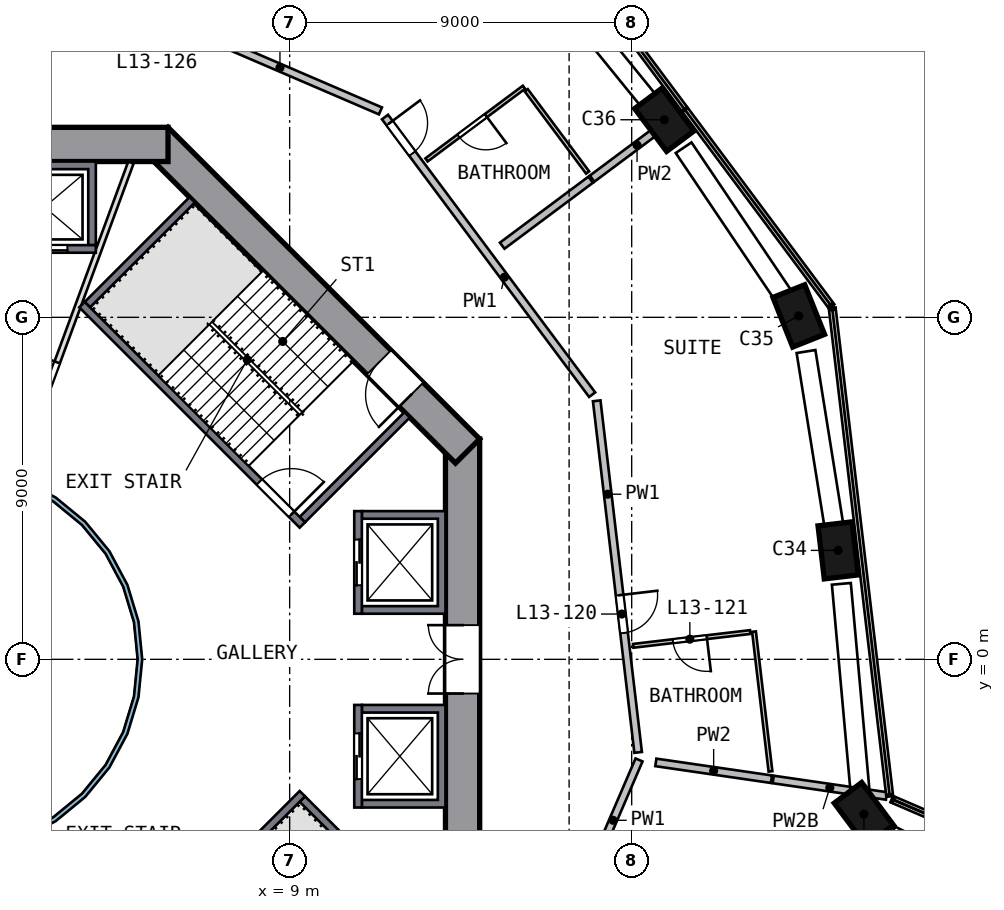
"""IFC4 building model, lengths in metres.
Left out: names, types, materials, properties, quantities, classifications, styles, units other than length and angle.
Written with IfcOpenShell. Run it as: python <this file> out.ifc"""

import sys

from ifc_helpers import new_model, si_unit, direction, frame, frame_2d, origin, origin_2d, place, context, subcontext, project, spatial, polyline, rectangle, outline, extrude, element, fill, save


model = new_model("IFC4")
c1 = context("Model", 3, precision=1e-05, world=origin(), true_north=direction((0.0, 1.0)))
c2 = subcontext(c1, "Body", "Model", "MODEL_VIEW")
j1 = project(units=[si_unit("LENGTHUNIT", "METRE"), si_unit("PLANEANGLEUNIT", "RADIAN")], contexts=[c1])
p1 = place(None, origin())
s1 = spatial("IfcSite", under=j1, at=p1, CompositionType="ELEMENT")
p2 = place(p1, origin())
s2 = spatial("IfcBuilding", under=s1, at=p2, CompositionType="ELEMENT")
p3 = place(p2, frame((0.0, 0.0, 60.0)))
s3 = spatial("IfcBuildingStorey", under=s2, at=p3, CompositionType="ELEMENT", Elevation=60.0)
p4 = place(p3, frame((24.093, -4.183, 0.0), z_axis=(0.014797173, 0.089479375, 0.99587875), x_axis=(0.59972786, -0.797738666, 0.062765553)))
e1 = element("IfcColumn", 1, at=p4, inside=s3, PredefinedType="COLUMN", context=c2, shape_type="SweptSolid", body=[
    extrude(rectangle(XDim=1.4, YDim=0.9, at=origin_2d()), origin(), (0.0, 0.0, 1.0), 4.207),
])
p5 = place(p3, frame((23.446, 2.763, 0.0), z_axis=(-0.010970439, 0.0868348, 0.99616232), x_axis=(-0.116510829, 0.989325596, -0.087521946)))
e2 = element("IfcColumn", 2, at=p5, inside=s3, PredefinedType="COLUMN", context=c2, shape_type="SweptSolid", body=[
    extrude(rectangle(XDim=1.4, YDim=0.9, at=origin_2d()), origin(), (0.0, 0.0, 1.0), 4.206),
])
p6 = place(p3, frame((22.437, 8.938, 0.0), z_axis=(-0.033833866, 0.082930694, 0.995980808), x_axis=(0.368430604, -0.925330874, 0.089563737)))
e3 = element("IfcColumn", 3, at=p6, inside=s3, PredefinedType="COLUMN", context=c2, shape_type="SweptSolid", body=[
    extrude(rectangle(XDim=1.4, YDim=0.9, at=origin_2d()), origin(), (0.0, 0.0, 1.0), 4.207),
])
p7 = place(p3, frame((18.924, 14.115, 0.0), z_axis=(-0.052936472, 0.069769341, 0.996157602), x_axis=(-0.595400375, 0.798641913, -0.087575616)))
e4 = element("IfcColumn", 4, at=p7, inside=s3, PredefinedType="COLUMN", context=c2, shape_type="SweptSolid", body=[
    extrude(rectangle(XDim=1.4, YDim=0.9, at=origin_2d()), origin(), (0.0, 0.0, 1.0), 4.206),
])
p8 = place(p3, frame((13.55, -5.799, 0.0), z_axis=(0.0, 0.0, 1.0), x_axis=(0.0, 1.0, 0.0)))
e5 = element("IfcWall", 5, at=p8, inside=s3, PredefinedType="SHEAR", context=c2, shape_type="SweptSolid", body=[
    extrude(rectangle(XDim=11.598, YDim=0.9, at=frame_2d((5.799, 0.0))), origin(), (0.0, 0.0, 1.0), 4.5),
])
p9 = place(p8, frame((4.899, 0.0, 0.0)))
e6 = element("IfcOpeningElement", 6, at=p9, cuts=e5, PredefinedType="OPENING", context=c2, shape_type="SweptSolid", body=[
    extrude(rectangle(XDim=1.8, YDim=2.1, at=frame_2d((0.9, 1.05))), frame((0.0, 0.46, 0.0), z_axis=(0.0, -1.0, 0.0), x_axis=(1.0, 0.0, 0.0)), (0.0, 0.0, 1.0), 0.92),
])
p10 = place(p3, frame((13.682, 5.481, 0.0), z_axis=(0.0, 0.0, 1.0), x_axis=(-0.707106781, 0.707106781, 0.0)))
e7 = element("IfcWall", 7, at=p10, inside=s3, PredefinedType="SHEAR", context=c2, shape_type="SweptSolid", body=[
    extrude(rectangle(XDim=11.598, YDim=0.9, at=frame_2d((5.799, 0.0))), origin(), (0.0, 0.0, 1.0), 4.5),
])
p11 = place(p10, frame((2.099, 0.0, 0.0)))
e8 = element("IfcOpeningElement", 8, at=p11, cuts=e7, PredefinedType="OPENING", context=c2, shape_type="SweptSolid", body=[
    extrude(rectangle(XDim=1.2, YDim=2.1, at=frame_2d((0.6, 1.05))), frame((0.0, 0.46, 0.0), z_axis=(0.0, -1.0, 0.0), x_axis=(1.0, 0.0, 0.0)), (0.0, 0.0, 1.0), 0.92),
])
p12 = place(p3, frame((5.799, 13.55, 0.0), z_axis=(0.0, 0.0, 1.0), x_axis=(-1.0, 0.0, 0.0)))
e9 = element("IfcWall", 9, at=p12, inside=s3, PredefinedType="SHEAR", context=c2, shape_type="SweptSolid", body=[
    extrude(rectangle(XDim=11.598, YDim=0.9, at=frame_2d((5.799, 0.0))), origin(), (0.0, 0.0, 1.0), 4.5),
])
p13 = place(p12, frame((4.899, 0.0, 0.0)))
e10 = element("IfcOpeningElement", 10, at=p13, cuts=e9, PredefinedType="OPENING", context=c2, shape_type="SweptSolid", body=[
    extrude(rectangle(XDim=1.8, YDim=2.1, at=frame_2d((0.9, 1.05))), frame((0.0, 0.46, 0.0), z_axis=(0.0, -1.0, 0.0), x_axis=(1.0, 0.0, 0.0)), (0.0, 0.0, 1.0), 0.92),
])
p14 = place(p3, origin())
e11 = element("IfcWall", 11, at=p14, inside=s3, PredefinedType="SOLIDWALL", context=c2, shape_type="SweptSolid", body=[
    extrude(outline(polyline([(13.1, -3.9), (10.9, -3.9), (10.9, -3.7), (12.9, -3.7), (12.9, -1.4), (10.9, -1.4), (10.9, -1.2), (13.1, -1.2), (13.1, -3.9)])), origin(), (0.0, 0.0, 1.0), 4.19),
])
p15 = place(p3, frame((10.8, -1.2, 0.0), z_axis=(0.0, 0.0, 1.0), x_axis=(0.0, -1.0, 0.0)))
e12 = element("IfcWall", 12, at=p15, inside=s3, PredefinedType="SOLIDWALL", context=c2, shape_type="SweptSolid", body=[
    extrude(rectangle(XDim=2.7, YDim=0.2, at=frame_2d((1.35, 0.0))), origin(), (0.0, 0.0, 1.0), 4.19),
])
p16 = place(p15, frame((0.75, 0.0, 0.0)))
e13 = element("IfcOpeningElement", 13, at=p16, cuts=e12, PredefinedType="OPENING", context=c2, shape_type="SweptSolid", body=[
    extrude(rectangle(XDim=1.2, YDim=2.1, at=frame_2d((0.6, 1.05))), frame((0.0, 0.11, 0.0), z_axis=(0.0, -1.0, 0.0), x_axis=(1.0, 0.0, 0.0)), (0.0, 0.0, 1.0), 0.22),
])
p17 = place(p3, origin())
e14 = element("IfcWall", 14, at=p17, inside=s3, PredefinedType="SOLIDWALL", context=c2, shape_type="SweptSolid", body=[
    extrude(outline(polyline([(13.1, 3.9), (13.1, 1.2), (10.9, 1.2), (10.9, 1.4), (12.9, 1.4), (12.9, 3.7), (10.9, 3.7), (10.9, 3.9), (13.1, 3.9)])), origin(), (0.0, 0.0, 1.0), 4.19),
])
p18 = place(p3, frame((10.8, 1.2, 0.0), z_axis=(0.0, 0.0, 1.0), x_axis=(0.0, 1.0, 0.0)))
e15 = element("IfcWall", 15, at=p18, inside=s3, PredefinedType="SOLIDWALL", context=c2, shape_type="SweptSolid", body=[
    extrude(rectangle(XDim=2.7, YDim=0.2, at=frame_2d((1.35, 0.0))), origin(), (0.0, 0.0, 1.0), 4.19),
])
p19 = place(p18, frame((0.75, 0.0, 0.0)))
e16 = element("IfcOpeningElement", 16, at=p19, cuts=e15, PredefinedType="OPENING", context=c2, shape_type="SweptSolid", body=[
    extrude(rectangle(XDim=1.2, YDim=2.1, at=frame_2d((0.6, 1.05))), frame((0.0, 0.11, 0.0), z_axis=(0.0, -1.0, 0.0), x_axis=(1.0, 0.0, 0.0)), (0.0, 0.0, 1.0), 0.22),
])
p20 = place(p3, origin())
e17 = element("IfcWall", 17, at=p20, inside=s3, PredefinedType="SOLIDWALL", context=c2, shape_type="SweptSolid", body=[
    extrude(outline(polyline([(3.9, 13.1), (3.9, 10.9), (3.7, 10.9), (3.7, 12.9), (1.4, 12.9), (1.4, 10.9), (1.2, 10.9), (1.2, 13.1), (3.9, 13.1)])), origin(), (0.0, 0.0, 1.0), 4.19),
])
p21 = place(p3, frame((1.2, 10.8, 0.0), z_axis=(0.0, 0.0, 1.0), x_axis=(1.0, 0.0, 0.0)))
e18 = element("IfcWall", 18, at=p21, inside=s3, PredefinedType="SOLIDWALL", context=c2, shape_type="SweptSolid", body=[
    extrude(rectangle(XDim=2.7, YDim=0.2, at=frame_2d((1.35, 0.0))), origin(), (0.0, 0.0, 1.0), 4.19),
])
p22 = place(p21, frame((0.75, 0.0, 0.0)))
e19 = element("IfcOpeningElement", 19, at=p22, cuts=e18, PredefinedType="OPENING", context=c2, shape_type="SweptSolid", body=[
    extrude(rectangle(XDim=1.2, YDim=2.1, at=frame_2d((0.6, 1.05))), frame((0.0, 0.11, 0.0), z_axis=(0.0, -1.0, 0.0), x_axis=(1.0, 0.0, 0.0)), (0.0, 0.0, 1.0), 0.22),
])
p23 = place(p3, frame((3.535, 9.334, 0.0), z_axis=(0.0, 0.0, 1.0), x_axis=(0.707106781, -0.707106781, 0.0)))
e20 = element("IfcWall", 20, at=p23, inside=s3, PredefinedType="SOLIDWALL", context=c2, shape_type="SweptSolid", body=[
    extrude(rectangle(XDim=8.2, YDim=0.2, at=frame_2d((4.1, 0.0))), origin(), (0.0, 0.0, 1.0), 4.19),
])
p24 = place(p23, frame((6.6, 0.0, 0.0)))
e21 = element("IfcOpeningElement", 21, at=p24, cuts=e20, PredefinedType="OPENING", context=c2, shape_type="SweptSolid", body=[
    extrude(rectangle(XDim=1.2, YDim=2.1, at=frame_2d((0.6, 1.05))), frame((0.0, 0.11, 0.0), z_axis=(0.0, -1.0, 0.0), x_axis=(1.0, 0.0, 0.0)), (0.0, 0.0, 1.0), 0.22),
])
for number, where, z_axis, x_axis in (
    (22, (9.334, 3.677, 0.0), (0.0, 0.0, 1.0), (0.707, 0.707, 0.0)),
    (23, (3.677, 9.334, 0.0), (0.0, 0.0, 1.0), (0.707, 0.707, 0.0)),
):
    element("IfcWall", number, at=place(p3, frame(where, z_axis=z_axis, x_axis=x_axis)), inside=s3, PredefinedType="SOLIDWALL", context=c2, shape_type="SweptSolid", body=[
        extrude(rectangle(XDim=3.9, YDim=0.2, at=frame_2d((1.95, 0.0))), origin(), (0.0, 0.0, 1.0), 4.19),
    ])
p25 = place(p3, frame((9.334, -3.535, 0.0), z_axis=(0.0, 0.0, 1.0), x_axis=(-0.707106781, -0.707106781, 0.0)))
e24 = element("IfcWall", 24, at=p25, inside=s3, PredefinedType="SOLIDWALL", context=c2, shape_type="SweptSolid", body=[
    extrude(rectangle(XDim=8.2, YDim=0.2, at=frame_2d((4.1, 0.0))), origin(), (0.0, 0.0, 1.0), 4.19),
])
p26 = place(p25, frame((6.6, 0.0, 0.0)))
e25 = element("IfcOpeningElement", 25, at=p26, cuts=e24, PredefinedType="OPENING", context=c2, shape_type="SweptSolid", body=[
    extrude(rectangle(XDim=1.2, YDim=2.1, at=frame_2d((0.6, 1.05))), frame((0.0, 0.11, 0.0), z_axis=(0.0, -1.0, 0.0), x_axis=(1.0, 0.0, 0.0)), (0.0, 0.0, 1.0), 0.22),
])
p27 = place(p3, frame((9.334, -3.677, 0.0), z_axis=(0.0, 0.0, 1.0), x_axis=(0.707106781, -0.707106781, 0.0)))
e26 = element("IfcWall", 26, at=p27, inside=s3, PredefinedType="SOLIDWALL", context=c2, shape_type="SweptSolid", body=[
    extrude(rectangle(XDim=3.9, YDim=0.2, at=frame_2d((1.95, 0.0))), origin(), (0.0, 0.0, 1.0), 4.19),
])
p28 = place(p3, frame((1.776, 4.813, 0.0), z_axis=(0.0, 0.0, 1.0), x_axis=(0.346112737, 0.93819293, 0.0)))
e27 = element("IfcWall", 27, at=p28, inside=s3, PredefinedType="PARTITIONING", context=c2, shape_type="SweptSolid", body=[
    extrude(rectangle(XDim=8.803, YDim=0.15, at=frame_2d((4.402, 0.0))), origin(), (0.0, 0.0, 1.0), 4.19),
])
p29 = place(p28, frame((1.4, 0.0, 0.0)))
e28 = element("IfcOpeningElement", 28, at=p29, cuts=e27, PredefinedType="OPENING", context=c2, shape_type="SweptSolid", body=[
    extrude(rectangle(XDim=1.8, YDim=2.1, at=frame_2d((0.9, 1.05))), frame((0.0, 0.085, 0.0), z_axis=(0.0, -1.0, 0.0), x_axis=(1.0, 0.0, 0.0)), (0.0, 0.0, 1.0), 0.17),
])
p30 = place(p3, origin())
e29 = element("IfcWall", 29, at=p30, inside=s3, PredefinedType="SOLIDWALL", context=c2, shape_type="SweptSolid", body=[
    extrude(outline(polyline([(5.021, -0.999), (4.73, -1.959), (4.257, -2.844), (3.62, -3.62), (2.844, -4.257), (1.959, -4.73), (0.999, -5.021), (0.0, -5.12), (-0.999, -5.021), (-1.959, -4.73), (-2.844, -4.257), (-3.62, -3.62), (-4.257, -2.844), (-4.73, -1.959), (-5.021, -0.999), (-5.12, 0.0), (-5.021, 0.999), (-4.73, 1.959), (-4.257, 2.844), (-3.62, 3.62), (-2.844, 4.257), (-1.959, 4.73), (-0.999, 5.021), (0.0, 5.12), (0.999, 5.021), (1.959, 4.73), (2.844, 4.257), (3.62, 3.62), (4.257, 2.844), (4.73, 1.959), (5.021, 0.999), (5.12, 0.0), (5.021, -0.999)]), holes=[polyline([(4.904, 0.976), (4.619, 1.913), (4.157, 2.778), (3.535, 3.535), (2.778, 4.157), (1.913, 4.619), (0.976, 4.904), (0.0, 5.0), (-0.976, 4.904), (-1.913, 4.619), (-2.778, 4.157), (-3.535, 3.535), (-4.157, 2.778), (-4.619, 1.913), (-4.904, 0.976), (-5.0, 0.0), (-4.904, -0.976), (-4.619, -1.913), (-4.157, -2.778), (-3.535, -3.535), (-2.778, -4.157), (-1.913, -4.619), (-0.976, -4.904), (0.0, -5.0), (0.976, -4.904), (1.913, -4.619), (2.778, -4.157), (3.535, -3.535), (4.157, -2.778), (4.619, -1.913), (4.904, -0.976), (5.0, 0.0), (4.904, 0.976)])]), origin(), (0.0, 0.0, 1.0), 4.19),
])
p31 = place(p3, frame((2.648, 18.193, 0.0), z_axis=(0.0, 0.0, 1.0), x_axis=(0.918582764, -0.395228675, 0.0)))
e30 = element("IfcWall", 30, at=p31, inside=s3, PredefinedType="SOLIDWALL", context=c2, shape_type="SweptSolid", body=[
    extrude(rectangle(XDim=9.516, YDim=0.2, at=frame_2d((4.758, 0.0))), origin(), (0.0, 0.0, 1.0), 4.19),
])
p32 = place(p31, frame((2.658, 0.0, 0.0)))
e31 = element("IfcOpeningElement", 31, at=p32, cuts=e30, PredefinedType="OPENING", context=c2, shape_type="SweptSolid", body=[
    extrude(rectangle(XDim=0.9, YDim=2.1, at=frame_2d((0.45, 1.05))), frame((0.0, 0.11, 0.0), z_axis=(0.0, -1.0, 0.0), x_axis=(1.0, 0.0, 0.0)), (0.0, 0.0, 1.0), 0.22),
])
p33 = place(p31, frame((0.3, 0.0, 0.0)))
e32 = element("IfcOpeningElement", 32, at=p33, cuts=e30, PredefinedType="OPENING", context=c2, shape_type="SweptSolid", body=[
    extrude(rectangle(XDim=0.9, YDim=2.1, at=frame_2d((0.45, 1.05))), frame((0.0, 0.11, 0.0), z_axis=(0.0, -1.0, 0.0), x_axis=(1.0, 0.0, 0.0)), (0.0, 0.0, 1.0), 0.22),
])
p34 = place(p3, frame((11.51, 14.271, 0.0), z_axis=(0.0, 0.0, 1.0), x_axis=(0.597893887, -0.801575262, 0.0)))
e33 = element("IfcWall", 33, at=p34, inside=s3, PredefinedType="SOLIDWALL", context=c2, shape_type="SweptSolid", body=[
    extrude(rectangle(XDim=9.116, YDim=0.2, at=frame_2d((4.558, 0.0))), origin(), (0.0, 0.0, 1.0), 4.19),
])
p35 = place(p34, frame((0.2, 0.0, 0.0)))
e34 = element("IfcOpeningElement", 34, at=p35, cuts=e33, PredefinedType="OPENING", context=c2, shape_type="SweptSolid", body=[
    extrude(rectangle(XDim=1.0, YDim=2.1, at=frame_2d((0.5, 1.05))), frame((0.0, 0.11, 0.0), z_axis=(0.0, -1.0, 0.0), x_axis=(1.0, 0.0, 0.0)), (0.0, 0.0, 1.0), 0.22),
])
p36 = place(p3, frame((16.826, -5.824, 0.0), z_axis=(0.0, 0.0, 1.0), x_axis=(0.39522258, 0.918585386, 0.0)))
e35 = element("IfcWall", 35, at=p36, inside=s3, PredefinedType="SOLIDWALL", context=c2, shape_type="SweptSolid", body=[
    extrude(rectangle(XDim=3.458, YDim=0.2, at=frame_2d((1.729, 0.0))), origin(), (0.0, 0.0, 1.0), 4.19),
])
p37 = place(p3, frame((17.08, 6.803, 0.0), z_axis=(0.0, 0.0, 1.0), x_axis=(0.117013065, -0.993130375, 0.0)))
e36 = element("IfcWall", 36, at=p37, inside=s3, PredefinedType="SOLIDWALL", context=c2, shape_type="SweptSolid", body=[
    extrude(rectangle(XDim=9.316, YDim=0.2, at=frame_2d((4.658, 0.0))), origin(), (0.0, 0.0, 1.0), 4.19),
])
p38 = place(p37, frame((5.15, 0.0, 0.0)))
e37 = element("IfcOpeningElement", 37, at=p38, cuts=e36, PredefinedType="OPENING", context=c2, shape_type="SweptSolid", body=[
    extrude(rectangle(XDim=1.0, YDim=2.1, at=frame_2d((0.5, 1.05))), frame((0.0, 0.11, 0.0), z_axis=(0.0, -1.0, 0.0), x_axis=(1.0, 0.0, 0.0)), (0.0, 0.0, 1.0), 0.22),
])
p39 = place(p3, frame((14.593, 10.885, 0.0), z_axis=(0.0, 0.0, 1.0), x_axis=(0.801560567, 0.597913587, 0.0)))
e38 = element("IfcWall", 38, at=p39, inside=s3, PredefinedType="SOLIDWALL", context=c2, shape_type="SweptSolid", body=[
    extrude(rectangle(XDim=2.905, YDim=0.2, at=frame_2d((1.452, 0.0))), origin(), (0.0, 0.0, 1.0), 4.19),
])
p40 = place(p3, frame((16.958, 12.649, 0.0), z_axis=(0.0, 0.0, 1.0), x_axis=(0.801545514, 0.597933767, 0.0)))
e39 = element("IfcWall", 39, at=p40, inside=s3, PredefinedType="SOLIDWALL", context=c2, shape_type="SweptSolid", body=[
    extrude(rectangle(XDim=2.952, YDim=0.2, at=frame_2d((1.476, 0.0))), origin(), (0.0, 0.0, 1.0), 4.19),
])
p41 = place(p3, frame((18.636, -2.712, 0.0), z_axis=(0.0, 0.0, 1.0), x_axis=(0.989572863, -0.144033152, 0.0)))
e40 = element("IfcWall", 40, at=p41, inside=s3, PredefinedType="SOLIDWALL", context=c2, shape_type="SweptSolid", body=[
    extrude(rectangle(XDim=3.075, YDim=0.2, at=frame_2d((1.537, 0.0))), origin(), (0.0, 0.0, 1.0), 4.19),
])
p42 = place(p3, frame((21.724, -3.161, 0.0), z_axis=(0.0, 0.0, 1.0), x_axis=(0.989568164, -0.144065429, 0.0)))
e41 = element("IfcWall", 41, at=p42, inside=s3, PredefinedType="SOLIDWALL", context=c2, shape_type="SweptSolid", body=[
    extrude(rectangle(XDim=3.011, YDim=0.2, at=frame_2d((1.506, 0.0))), origin(), (0.0, 0.0, 1.0), 3.69),
])
p43 = place(p3, frame((15.166, 15.055, 0.0), z_axis=(0.0, 0.0, 1.0), x_axis=(-0.801553723, -0.597922761, 0.0)))
e42 = element("IfcWall", 42, at=p43, inside=s3, PredefinedType="PARTITIONING", context=c2, shape_type="SweptSolid", body=[
    extrude(rectangle(XDim=3.2, YDim=0.1, at=frame_2d((1.6, 0.0))), origin(), (0.0, 0.0, 1.0), 4.19),
])
p44 = place(p43, frame((1.25, 0.0, 0.0)))
e43 = element("IfcOpeningElement", 43, at=p44, cuts=e42, PredefinedType="OPENING", context=c2, shape_type="SweptSolid", body=[
    extrude(rectangle(XDim=0.9, YDim=2.1, at=frame_2d((0.45, 1.05))), frame((0.0, 0.06, 0.0), z_axis=(0.0, -1.0, 0.0), x_axis=(1.0, 0.0, 0.0)), (0.0, 0.0, 1.0), 0.12),
])
p45 = place(p3, frame((15.226, 14.975, 0.0), z_axis=(0.0, 0.0, 1.0), x_axis=(0.597914488, -0.801559895, 0.0)))
e44 = element("IfcWall", 44, at=p45, inside=s3, PredefinedType="PARTITIONING", context=c2, shape_type="SweptSolid", body=[
    extrude(rectangle(XDim=2.7, YDim=0.1, at=frame_2d((1.35, 0.0))), origin(), (0.0, 0.0, 1.0), 4.19),
])
p46 = place(p3, frame((21.119, 0.718, 0.0), z_axis=(0.0, 0.0, 1.0), x_axis=(-0.993128007, -0.117033166, 0.0)))
e45 = element("IfcWall", 45, at=p46, inside=s3, PredefinedType="PARTITIONING", context=c2, shape_type="SweptSolid", body=[
    extrude(rectangle(XDim=3.1, YDim=0.1, at=frame_2d((1.55, 0.0))), origin(), (0.0, 0.0, 1.0), 4.19),
])
p47 = place(p46, frame((1.15, 0.0, 0.0)))
e46 = element("IfcOpeningElement", 46, at=p47, cuts=e45, PredefinedType="OPENING", context=c2, shape_type="SweptSolid", body=[
    extrude(rectangle(XDim=0.9, YDim=2.1, at=frame_2d((0.45, 1.05))), frame((0.0, 0.06, 0.0), z_axis=(0.0, -1.0, 0.0), x_axis=(1.0, 0.0, 0.0)), (0.0, 0.0, 1.0), 0.12),
])
p48 = place(p3, frame((21.219, 0.729, 0.0), z_axis=(0.0, 0.0, 1.0), x_axis=(0.116998046, -0.993132145, 0.0)))
e47 = element("IfcWall", 47, at=p48, inside=s3, PredefinedType="PARTITIONING", context=c2, shape_type="SweptSolid", body=[
    extrude(rectangle(XDim=3.704, YDim=0.1, at=frame_2d((1.852, 0.0))), origin(), (0.0, 0.0, 1.0), 4.19),
])
p49 = place(p16, origin())
e48 = element("IfcDoor", 48, at=p49, inside=s3, OperationType="DOUBLE_DOOR_SLIDING", PredefinedType="DOOR", context=c2, shape_type="SweptSolid", body=[
    extrude(rectangle(XDim=1.2, YDim=2.1, at=frame_2d((0.6, 1.05))), frame((0.0, 0.025, 0.0), z_axis=(0.0, -1.0, 0.0), x_axis=(1.0, 0.0, 0.0)), (0.0, 0.0, 1.0), 0.05),
])
fill(e13, e48)
p50 = place(p19, origin())
e49 = element("IfcDoor", 49, at=p50, inside=s3, OperationType="DOUBLE_DOOR_SLIDING", PredefinedType="DOOR", context=c2, shape_type="SweptSolid", body=[
    extrude(rectangle(XDim=1.2, YDim=2.1, at=frame_2d((0.6, 1.05))), frame((0.0, 0.025, 0.0), z_axis=(0.0, -1.0, 0.0), x_axis=(1.0, 0.0, 0.0)), (0.0, 0.0, 1.0), 0.05),
])
fill(e16, e49)
p51 = place(p22, origin())
e50 = element("IfcDoor", 50, at=p51, inside=s3, OperationType="DOUBLE_DOOR_SLIDING", PredefinedType="DOOR", context=c2, shape_type="SweptSolid", body=[
    extrude(rectangle(XDim=1.2, YDim=2.1, at=frame_2d((0.6, 1.05))), frame((0.0, 0.025, 0.0), z_axis=(0.0, -1.0, 0.0), x_axis=(1.0, 0.0, 0.0)), (0.0, 0.0, 1.0), 0.05),
])
fill(e19, e50)
p52 = place(p24, origin())
e51 = element("IfcDoor", 51, at=p52, inside=s3, OperationType="SINGLE_SWING_RIGHT", PredefinedType="DOOR", context=c2, shape_type="SweptSolid", body=[
    extrude(rectangle(XDim=1.2, YDim=2.1, at=frame_2d((0.6, 1.05))), frame((0.0, 0.025, 0.0), z_axis=(0.0, -1.0, 0.0), x_axis=(1.0, 0.0, 0.0)), (0.0, 0.0, 1.0), 0.05),
])
fill(e21, e51)
p53 = place(p9, origin())
e52 = element("IfcDoor", 52, at=p53, inside=s3, OperationType="DOUBLE_DOOR_SINGLE_SWING", PredefinedType="DOOR", context=c2, shape_type="SweptSolid", body=[
    extrude(rectangle(XDim=1.8, YDim=2.1, at=frame_2d((0.9, 1.05))), frame((0.0, 0.025, 0.0), z_axis=(0.0, -1.0, 0.0), x_axis=(1.0, 0.0, 0.0)), (0.0, 0.0, 1.0), 0.05),
])
fill(e6, e52)
p54 = place(p11, origin())
e53 = element("IfcDoor", 53, at=p54, inside=s3, OperationType="SINGLE_SWING_LEFT", PredefinedType="DOOR", context=c2, shape_type="SweptSolid", body=[
    extrude(rectangle(XDim=1.2, YDim=2.1, at=frame_2d((0.6, 1.05))), frame((0.0, 0.025, 0.0), z_axis=(0.0, -1.0, 0.0), x_axis=(1.0, 0.0, 0.0)), (0.0, 0.0, 1.0), 0.05),
])
fill(e8, e53)
p55 = place(p29, origin())
e54 = element("IfcDoor", 54, at=p55, inside=s3, OperationType="DOUBLE_DOOR_SINGLE_SWING", PredefinedType="DOOR", context=c2, shape_type="SweptSolid", body=[
    extrude(rectangle(XDim=1.8, YDim=2.1, at=frame_2d((0.9, 1.05))), frame((0.0, 0.025, 0.0), z_axis=(0.0, -1.0, 0.0), x_axis=(1.0, 0.0, 0.0)), (0.0, 0.0, 1.0), 0.05),
])
fill(e28, e54)
p56 = place(p38, origin())
e55 = element("IfcDoor", 55, at=p56, inside=s3, OperationType="SINGLE_SWING_LEFT", PredefinedType="DOOR", context=c2, shape_type="SweptSolid", body=[
    extrude(rectangle(XDim=1.0, YDim=2.1, at=frame_2d((0.5, 1.05))), frame((0.0, 0.025, 0.0), z_axis=(0.0, -1.0, 0.0), x_axis=(1.0, 0.0, 0.0)), (0.0, 0.0, 1.0), 0.05),
])
fill(e37, e55)
p57 = place(p47, origin())
e56 = element("IfcDoor", 56, at=p57, inside=s3, OperationType="SINGLE_SWING_LEFT", PredefinedType="DOOR", context=c2, shape_type="SweptSolid", body=[
    extrude(rectangle(XDim=0.9, YDim=2.1, at=frame_2d((0.45, 1.05))), frame((0.0, 0.025, 0.0), z_axis=(0.0, -1.0, 0.0), x_axis=(1.0, 0.0, 0.0)), (0.0, 0.0, 1.0), 0.05),
])
fill(e46, e56)
p58 = place(p35, origin())
e57 = element("IfcDoor", 57, at=p58, inside=s3, OperationType="SINGLE_SWING_LEFT", PredefinedType="DOOR", context=c2, shape_type="SweptSolid", body=[
    extrude(rectangle(XDim=1.0, YDim=2.1, at=frame_2d((0.5, 1.05))), frame((0.0, 0.025, 0.0), z_axis=(0.0, -1.0, 0.0), x_axis=(1.0, 0.0, 0.0)), (0.0, 0.0, 1.0), 0.05),
])
fill(e34, e57)
p59 = place(p44, origin())
e58 = element("IfcDoor", 58, at=p59, inside=s3, OperationType="SINGLE_SWING_LEFT", PredefinedType="DOOR", context=c2, shape_type="SweptSolid", body=[
    extrude(rectangle(XDim=0.9, YDim=2.1, at=frame_2d((0.45, 1.05))), frame((0.0, 0.025, 0.0), z_axis=(0.0, -1.0, 0.0), x_axis=(1.0, 0.0, 0.0)), (0.0, 0.0, 1.0), 0.05),
])
fill(e43, e58)
save(model, sys.argv[1])
